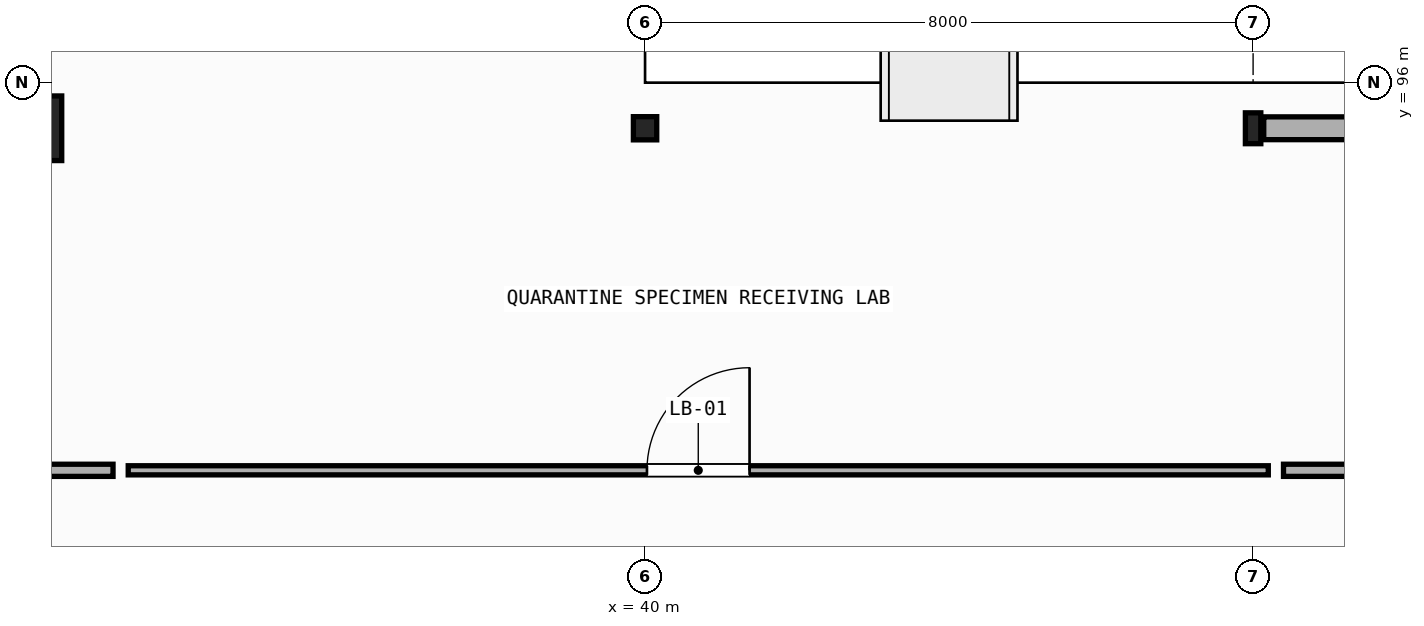
"""IFC4 building model, lengths in metres.
Left out: names, types, materials, properties, quantities, classifications, styles, units other than length and angle.
Written with IfcOpenShell. Run it as: python <this file> out.ifc"""

import sys

from ifc_helpers import new_model, si_unit, direction, frame, frame_2d, origin, origin_2d, place, context, subcontext, project, spatial, rectangle, hollow_rectangle, i_section, extrude, element, fill, save


model = new_model("IFC4")
c1 = context("Model", 3, precision=1e-05, world=origin(), true_north=direction((0.0, 1.0)))
c2 = subcontext(c1, "Body", "Model", "MODEL_VIEW")
j1 = project(units=[si_unit("LENGTHUNIT", "METRE"), si_unit("PLANEANGLEUNIT", "RADIAN")], contexts=[c1])
p1 = place(None, origin())
s1 = spatial("IfcSite", under=j1, at=p1, CompositionType="ELEMENT")
p2 = place(p1, origin())
s2 = spatial("IfcBuilding", under=s1, at=p2, CompositionType="ELEMENT")
p3 = place(p2, origin())
s3 = spatial("IfcBuildingStorey", under=s2, at=p3, CompositionType="ELEMENT", Elevation=0.0)
p4 = place(p3, frame((32.0, 95.4, 0.0), z_axis=(0.0, 0.0, 1.0), x_axis=(1.0, 0.0, 0.0)))
e1 = element("IfcColumn", 1, at=p4, inside=s3, PredefinedType="PILASTER", context=c2, shape_type="SweptSolid", body=[
    extrude(rectangle(XDim=0.65, YDim=0.85, at=origin_2d()), origin(), (0.0, 0.0, 1.0), 5.08),
])
p5 = place(p3, frame((40.0, 95.4, 0.0), z_axis=(0.0, 0.0, 1.0), x_axis=(0.0, 1.0, 0.0)))
e2 = element("IfcColumn", 2, at=p5, inside=s3, PredefinedType="COLUMN", context=c2, shape_type="SweptSolid", body=[
    extrude(i_section(OverallWidth=0.305, OverallDepth=0.307, WebThickness=0.01, FlangeThickness=0.015, FilletRadius=0.013, at=origin_2d()), origin(), (0.0, 0.0, 1.0), 5.08),
])
p6 = place(p3, frame((48.0, 95.4, 0.0), z_axis=(0.0, 0.0, 1.0), x_axis=(1.0, 0.0, 0.0)))
e3 = element("IfcColumn", 3, at=p6, inside=s3, PredefinedType="COLUMN", context=c2, shape_type="SweptSolid", body=[
    extrude(hollow_rectangle(XDim=0.203, YDim=0.406, WallThickness=0.012, InnerFilletRadius=0.012, OuterFilletRadius=0.024, at=origin_2d()), origin(), (0.0, 0.0, 1.0), 5.08),
])
p7 = place(p3, frame((48.14, 95.4, 0.0), z_axis=(0.0, 0.0, 1.0), x_axis=(1.0, 0.0, 0.0)))
e4 = element("IfcWall", 4, at=p7, inside=s3, PredefinedType="STANDARD", context=c2, shape_type="SweptSolid", body=[
    extrude(rectangle(XDim=7.21, YDim=0.3, at=frame_2d((3.605, 0.0))), origin(), (0.0, 0.0, 1.0), 4.581),
])
p8 = place(p7, frame((2.705, 0.0, 0.0)))
e5 = element("IfcOpeningElement", 5, at=p8, cuts=e4, PredefinedType="OPENING", context=c2, shape_type="SweptSolid", body=[
    extrude(rectangle(XDim=1.8, YDim=2.35, at=frame_2d((0.9, 1.175))), frame((0.0, 0.16, 0.0), z_axis=(0.0, -1.0, 0.0), x_axis=(1.0, 0.0, 0.0)), (0.0, 0.0, 1.0), 0.32),
])
p9 = place(p3, frame((25.0, 90.9, 0.0), z_axis=(0.0, 0.0, 1.0), x_axis=(1.0, 0.0, 0.0)))
e6 = element("IfcWall", 6, at=p9, inside=s3, PredefinedType="PARTITIONING", context=c2, shape_type="SweptSolid", body=[
    extrude(rectangle(XDim=8.0, YDim=0.16, at=frame_2d((4.0, 0.0))), origin(), (0.0, 0.0, 1.0), 4.29),
])
p10 = place(p9, frame((3.275, 0.0, 0.0)))
e7 = element("IfcOpeningElement", 7, at=p10, cuts=e6, PredefinedType="OPENING", context=c2, shape_type="SweptSolid", body=[
    extrude(rectangle(XDim=1.45, YDim=2.25, at=frame_2d((0.725, 1.125))), frame((0.0, 0.09, 0.0), z_axis=(0.0, -1.0, 0.0), x_axis=(1.0, 0.0, 0.0)), (0.0, 0.0, 1.0), 0.18),
])
p11 = place(p3, frame((33.2, 90.9, 0.0), z_axis=(0.0, 0.0, 1.0), x_axis=(1.0, 0.0, 0.0)))
e8 = element("IfcWall", 8, at=p11, inside=s3, PredefinedType="PARTITIONING", context=c2, shape_type="SweptSolid", body=[
    extrude(rectangle(XDim=15.0, YDim=0.12, at=frame_2d((7.5, 0.0))), origin(), (0.0, 0.0, 1.0), 4.278),
])
p12 = place(p11, frame((6.825, 0.0, 0.0)))
e9 = element("IfcOpeningElement", 9, at=p12, cuts=e8, PredefinedType="OPENING", context=c2, shape_type="SweptSolid", body=[
    extrude(rectangle(XDim=1.35, YDim=2.25, at=frame_2d((0.675, 1.125))), frame((0.0, 0.07, 0.0), z_axis=(0.0, -1.0, 0.0), x_axis=(1.0, 0.0, 0.0)), (0.0, 0.0, 1.0), 0.14),
])
p13 = place(p3, frame((48.4, 90.9, 0.0), z_axis=(0.0, 0.0, 1.0), x_axis=(1.0, 0.0, 0.0)))
e10 = element("IfcWall", 10, at=p13, inside=s3, PredefinedType="PARTITIONING", context=c2, shape_type="SweptSolid", body=[
    extrude(rectangle(XDim=6.6, YDim=0.16, at=frame_2d((3.3, 0.0))), origin(), (0.0, 0.0, 1.0), 4.29),
])
p14 = place(p13, frame((2.675, 0.0, 0.0)))
e11 = element("IfcOpeningElement", 11, at=p14, cuts=e10, PredefinedType="OPENING", context=c2, shape_type="SweptSolid", body=[
    extrude(rectangle(XDim=1.25, YDim=2.2, at=frame_2d((0.625, 1.1))), frame((0.0, 0.09, 0.0), z_axis=(0.0, -1.0, 0.0), x_axis=(1.0, 0.0, 0.0)), (0.0, 0.0, 1.0), 0.18),
])
p15 = place(p12, origin())
e12 = element("IfcDoor", 12, at=p15, inside=s3, OperationType="SINGLE_SWING_RIGHT", PredefinedType="DOOR", context=c2, shape_type="SweptSolid", body=[
    extrude(rectangle(XDim=1.35, YDim=2.25, at=frame_2d((0.675, 1.125))), frame((0.0, 0.025, 0.0), z_axis=(0.0, -1.0, 0.0), x_axis=(1.0, 0.0, 0.0)), (0.0, 0.0, 1.0), 0.05),
])
fill(e9, e12)
save(model, sys.argv[1])
